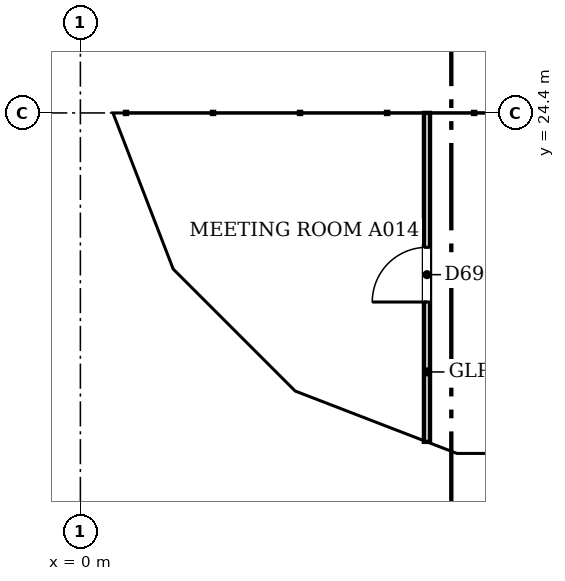
"""IFC4 building model, lengths in metres.
Left out: names, types, materials, properties, quantities, classifications, styles, units other than length and angle.
Written with IfcOpenShell. Run it as: python <this file> out.ifc"""

import sys

from ifc_helpers import new_model, si_unit, direction, frame, frame_2d, origin, place, context, subcontext, project, spatial, polyline, rectangle, outline, extrude, faceted_brep, source, transform, mapped, element, fill, save


model = new_model("IFC4")
c1 = context("Model", 3, precision=1e-05, world=origin(), true_north=direction((0.0, 1.0)))
c2 = subcontext(c1, "Body", "Model", "MODEL_VIEW")
j1 = project(units=[si_unit("LENGTHUNIT", "METRE"), si_unit("PLANEANGLEUNIT", "RADIAN")], contexts=[c1])
p1 = place(None, origin())
s1 = spatial("IfcSite", under=j1, at=p1, CompositionType="ELEMENT")
p2 = place(p1, origin())
s2 = spatial("IfcBuilding", under=s1, at=p2, CompositionType="ELEMENT")
p3 = place(p2, frame((0.0, 0.0, 48.6)))
s3 = spatial("IfcBuildingStorey", under=s2, at=p3, CompositionType="ELEMENT", Elevation=48.6)
m1 = source(origin(), c2, "Body", "Brep", [
    faceted_brep([(3.05, -0.25, 0.0), (6.053, -0.25, 3.8), (3.05, -0.25, 7.6), (0.0, -0.25, 3.8), (0.0, 0.25, 3.8), (3.05, 0.25, 7.6), (6.007, 0.25, 3.859), (6.007, 0.25, 3.741), (3.05, 0.25, 0.0), (6.053, 0.0, 3.8)], [[[0, 1, 2, 3]], [[4, 5, 6, 7, 8]], [[8, 7, 9, 1, 0]], [[6, 5, 2, 1, 9]], [[5, 4, 3, 2]], [[4, 8, 0, 3]], [[7, 6, 9]]]),
])
p4 = place(p3, frame((0.25, 30.5, -3.8), z_axis=(0.0, 0.0, 1.0), x_axis=(0.0, -1.0, 0.0)))
e1 = element("IfcWall", 1, at=p4, inside=s3, PredefinedType="SOLIDWALL", context=c2, shape_type="MappedRepresentation", body=[
    mapped(m1, transform((0.0, 0.0, 0.0), scale=1.0)),
])
m2 = source(origin(), c2, "Body", "SweptSolid", [
    extrude(outline(polyline([(3.049, 0.401), (5.735, 3.8), (3.049, 7.199), (0.321, 3.8), (3.049, 0.401)])), frame((0.0, 0.26, 0.0), z_axis=(0.0, -1.0, 0.0), x_axis=(1.0, 0.0, 0.0)), (0.0, 0.0, 1.0), 0.52),
])
p5 = place(p4, origin())
e2 = element("IfcOpeningElement", 2, at=p5, cuts=e1, PredefinedType="OPENING", context=c2, shape_type="MappedRepresentation", body=[
    mapped(m2, transform((0.0, 0.0, 0.0), scale=1.0)),
])
m3 = source(origin(), c2, "Body", "Brep", [
    faceted_brep([(2.95, -0.25, 0.0), (3.003, -0.25, 0.068), (3.003, -0.25, 7.531), (2.95, -0.25, 7.6), (0.0, -0.25, 3.8), (0.047, 0.25, 3.86), (2.898, 0.25, 7.532), (2.898, 0.25, 0.068), (0.047, 0.25, 3.74), (2.95, 0.0, 0.0), (2.95, 0.0, 7.6), (0.0, 0.0, 3.8)], [[[0, 1, 2, 3, 4]], [[5, 6, 7, 8]], [[1, 0, 9]], [[10, 3, 2]], [[6, 5, 11, 4, 3, 10]], [[8, 7, 9, 0, 4, 11]], [[8, 11, 5]], [[1, 9, 7, 6, 10, 2]]]),
])
p6 = place(p3, frame((0.25, 24.447, -3.8), z_axis=(0.0, 0.0, 1.0), x_axis=(0.35992665181, -0.932980602862, 0.0)))
e3 = element("IfcWall", 3, at=p6, inside=s3, PredefinedType="SOLIDWALL", context=c2, shape_type="MappedRepresentation", body=[
    mapped(m3, transform((0.0, 0.0, 0.0), scale=1.0)),
])
m4 = source(origin(), c2, "Body", "SweptSolid", [
    extrude(outline(polyline([(2.75, 6.935), (0.316, 3.8), (2.75, 0.665), (2.75, 6.935)])), frame((0.0, 0.26, 0.0), z_axis=(0.0, -1.0, 0.0), x_axis=(1.0, 0.0, 0.0)), (0.0, 0.0, 1.0), 0.52),
])
p7 = place(p6, origin())
e4 = element("IfcOpeningElement", 4, at=p7, cuts=e3, PredefinedType="OPENING", context=c2, shape_type="MappedRepresentation", body=[
    mapped(m4, transform((0.0, 0.0, 0.0), scale=1.0)),
])
m5 = source(origin(), c2, "Body", "Brep", [
    faceted_brep([(0.053, -0.25, 0.0), (2.997, -0.25, 3.8), (0.053, -0.25, 7.6), (0.0, -0.25, 7.532), (0.0, -0.25, 0.068), (0.106, 0.25, 7.531), (2.944, 0.25, 3.868), (2.944, 0.25, 3.732), (0.106, 0.25, 0.068), (2.997, 0.0, 3.8), (0.053, 0.0, 0.0), (0.053, 0.0, 7.6)], [[[0, 1, 2, 3, 4]], [[5, 6, 7, 8]], [[8, 7, 9, 1, 0, 10]], [[6, 5, 11, 2, 1, 9]], [[3, 2, 11]], [[10, 0, 4]], [[8, 10, 4, 3, 11, 5]], [[7, 6, 9]]]),
])
p8 = place(p3, frame((1.274, 21.731, -3.8), z_axis=(0.0, 0.0, 1.0), x_axis=(0.707147509625, -0.707066050402, 0.0)))
e5 = element("IfcWall", 5, at=p8, inside=s3, PredefinedType="SOLIDWALL", context=c2, shape_type="MappedRepresentation", body=[
    mapped(m5, transform((0.0, 0.0, 0.0), scale=1.0)),
])
m6 = source(origin(), c2, "Body", "SweptSolid", [
    extrude(outline(polyline([(0.253, 0.666), (2.681, 3.8), (0.253, 6.934), (0.253, 0.666)])), frame((0.0, 0.26, 0.0), z_axis=(0.0, -1.0, 0.0), x_axis=(1.0, 0.0, 0.0)), (0.0, 0.0, 1.0), 0.52),
])
p9 = place(p8, origin())
e6 = element("IfcOpeningElement", 6, at=p9, cuts=e5, PredefinedType="OPENING", context=c2, shape_type="MappedRepresentation", body=[
    mapped(m6, transform((0.0, 0.0, 0.0), scale=1.0)),
])
m7 = source(origin(), c2, "Body", "Brep", [
    faceted_brep([(2.95, -0.25, 0.0), (2.997, -0.25, 0.059), (2.997, -0.25, 7.541), (2.95, -0.25, 7.6), (0.0, -0.25, 3.8), (0.053, 0.25, 3.868), (2.904, 0.25, 7.54), (2.904, 0.25, 0.06), (0.053, 0.25, 3.732), (2.95, 0.0, 0.0), (2.95, 0.0, 7.6), (0.0, 0.0, 3.8)], [[[0, 1, 2, 3, 4]], [[5, 6, 7, 8]], [[1, 0, 9]], [[10, 3, 2]], [[6, 5, 11, 4, 3, 10]], [[8, 7, 9, 0, 4, 11]], [[8, 11, 5]], [[1, 9, 7, 6, 10, 2]]]),
])
p10 = place(p3, frame((3.394, 19.612, -3.8), z_axis=(0.0, 0.0, 1.0), x_axis=(0.932990326376, -0.359901446078, 0.0)))
e7 = element("IfcWall", 7, at=p10, inside=s3, PredefinedType="SOLIDWALL", context=c2, shape_type="MappedRepresentation", body=[
    mapped(m7, transform((0.0, 0.0, 0.0), scale=1.0)),
])
p11 = place(p10, origin())
e8 = element("IfcOpeningElement", 8, at=p11, cuts=e7, PredefinedType="OPENING", context=c2, shape_type="MappedRepresentation", body=[
    mapped(m4, transform((0.0, 0.0, 0.0), scale=1.0)),
])
m8 = source(origin(), c2, "Body", "Brep", [
    faceted_brep([(0.047, -0.25, 0.0), (3.05, -0.25, 3.8), (0.047, -0.25, 7.6), (0.0, -0.25, 7.54), (0.0, -0.25, 0.06), (0.093, 0.25, 7.541), (3.05, 0.25, 3.8), (0.093, 0.25, 0.059), (0.047, 0.0, 0.0), (0.047, 0.0, 7.6)], [[[0, 1, 2, 3, 4]], [[5, 6, 7]], [[7, 6, 1, 0, 8]], [[6, 5, 9, 2, 1]], [[3, 2, 9]], [[8, 0, 4]], [[7, 8, 4, 3, 9, 5]]]),
])
p12 = place(p3, frame((6.1, 18.55, -3.8), z_axis=(0.0, 0.0, 1.0), x_axis=(1.0, 0.0, 0.0)))
e9 = element("IfcWall", 9, at=p12, inside=s3, PredefinedType="SOLIDWALL", context=c2, shape_type="MappedRepresentation", body=[
    mapped(m8, transform((0.0, 0.0, 0.0), scale=1.0)),
])
m9 = source(origin(), c2, "Body", "SweptSolid", [
    extrude(outline(polyline([(0.247, 0.656), (2.731, 3.8), (0.247, 6.944), (0.247, 0.656)])), frame((0.0, 0.26, 0.0), z_axis=(0.0, -1.0, 0.0), x_axis=(1.0, 0.0, 0.0)), (0.0, 0.0, 1.0), 0.52),
])
p13 = place(p12, origin())
e10 = element("IfcOpeningElement", 10, at=p13, cuts=e9, PredefinedType="OPENING", context=c2, shape_type="MappedRepresentation", body=[
    mapped(m9, transform((0.0, 0.0, 0.0), scale=1.0)),
])
p14 = place(p2, frame((0.0, 0.0, 52.4)))
s4 = spatial("IfcBuildingStorey", under=s2, at=p14, CompositionType="ELEMENT", Elevation=52.4)
m10 = source(origin(), c2, "Body", "Brep", [
    faceted_brep([(3.003, -0.25, 0.0), (3.05, -0.25, 0.06), (3.05, -0.25, 7.54), (3.003, -0.25, 7.6), (0.0, -0.25, 3.8), (0.0, 0.25, 3.8), (2.957, 0.25, 7.541), (2.957, 0.25, 0.059), (3.003, 0.0, 0.0), (3.003, 0.0, 7.6)], [[[0, 1, 2, 3, 4]], [[5, 6, 7]], [[1, 0, 8]], [[9, 3, 2]], [[6, 5, 4, 3, 9]], [[5, 7, 8, 0, 4]], [[1, 8, 7, 6, 9, 2]]]),
])
p15 = place(p14, frame((0.25, 27.45, -3.8), z_axis=(0.0, 0.0, 1.0), x_axis=(0.0, -1.0, 0.0)))
e11 = element("IfcWall", 11, at=p15, inside=s4, PredefinedType="SOLIDWALL", context=c2, shape_type="MappedRepresentation", body=[
    mapped(m10, transform((0.0, 0.0, 0.0), scale=1.0)),
])
m11 = source(origin(), c2, "Body", "SweptSolid", [
    extrude(outline(polyline([(2.803, 6.944), (0.319, 3.8), (2.803, 0.656), (2.803, 6.944)])), frame((0.0, 0.26, 0.0), z_axis=(0.0, -1.0, 0.0), x_axis=(1.0, 0.0, 0.0)), (0.0, 0.0, 1.0), 0.52),
])
p16 = place(p15, origin())
e12 = element("IfcOpeningElement", 12, at=p16, cuts=e11, PredefinedType="OPENING", context=c2, shape_type="MappedRepresentation", body=[
    mapped(m11, transform((0.0, 0.0, 0.0), scale=1.0)),
])
m12 = source(origin(), c2, "Body", "Brep", [
    faceted_brep([(0.047, -0.25, 0.0), (2.997, -0.25, 3.8), (0.047, -0.25, 7.6), (0.0, -0.25, 7.541), (0.0, -0.25, 0.059), (0.093, 0.25, 7.54), (2.944, 0.25, 3.868), (2.944, 0.25, 3.732), (0.093, 0.25, 0.06), (2.997, 0.0, 3.8), (0.047, 0.0, 0.0), (0.047, 0.0, 7.6)], [[[0, 1, 2, 3, 4]], [[5, 6, 7, 8]], [[8, 7, 9, 1, 0, 10]], [[6, 5, 11, 2, 1, 9]], [[3, 2, 11]], [[10, 0, 4]], [[8, 10, 4, 3, 11, 5]], [[9, 7, 6]]]),
])
p17 = place(p14, frame((0.233, 24.49, -3.8), z_axis=(0.0, 0.0, 1.0), x_axis=(0.359901446078, -0.932990326376, 0.0)))
e13 = element("IfcWall", 13, at=p17, inside=s4, PredefinedType="SOLIDWALL", context=c2, shape_type="MappedRepresentation", body=[
    mapped(m12, transform((0.0, 0.0, 0.0), scale=1.0)),
])
m13 = source(origin(), c2, "Body", "SweptSolid", [
    extrude(outline(polyline([(0.247, 0.665), (2.681, 3.8), (0.247, 6.935), (0.247, 0.665)])), frame((0.0, 0.26, 0.0), z_axis=(0.0, -1.0, 0.0), x_axis=(1.0, 0.0, 0.0)), (0.0, 0.0, 1.0), 0.52),
])
p18 = place(p17, origin())
e14 = element("IfcOpeningElement", 14, at=p18, cuts=e13, PredefinedType="OPENING", context=c2, shape_type="MappedRepresentation", body=[
    mapped(m13, transform((0.0, 0.0, 0.0), scale=1.0)),
])
m14 = source(origin(), c2, "Body", "Brep", [
    faceted_brep([(2.944, -0.25, 0.0), (2.997, -0.25, 0.068), (2.997, -0.25, 7.532), (2.944, -0.25, 7.6), (0.0, -0.25, 3.8), (0.053, 0.25, 3.868), (2.891, 0.25, 7.532), (2.891, 0.25, 0.068), (0.053, 0.25, 3.731), (2.944, 0.0, 0.0), (2.944, 0.0, 7.6), (0.0, 0.0, 3.8)], [[[0, 1, 2, 3, 4]], [[5, 6, 7, 8]], [[1, 0, 9]], [[10, 3, 2]], [[6, 5, 11, 4, 3, 10]], [[8, 7, 9, 0, 4, 11]], [[8, 11, 5]], [[1, 9, 7, 6, 10, 2]]]),
])
p19 = place(p14, frame((1.312, 21.694, -3.8), z_axis=(0.0, 0.0, 1.0), x_axis=(0.707066050402, -0.707147509625, 0.0)))
e15 = element("IfcWall", 15, at=p19, inside=s4, PredefinedType="SOLIDWALL", context=c2, shape_type="MappedRepresentation", body=[
    mapped(m14, transform((0.0, 0.0, 0.0), scale=1.0)),
])
m15 = source(origin(), c2, "Body", "SweptSolid", [
    extrude(outline(polyline([(2.744, 6.934), (0.316, 3.8), (2.744, 0.666), (2.744, 6.934)])), frame((0.0, 0.26, 0.0), z_axis=(0.0, -1.0, 0.0), x_axis=(1.0, 0.0, 0.0)), (0.0, 0.0, 1.0), 0.52),
])
p20 = place(p19, origin())
e16 = element("IfcOpeningElement", 16, at=p20, cuts=e15, PredefinedType="OPENING", context=c2, shape_type="MappedRepresentation", body=[
    mapped(m15, transform((0.0, 0.0, 0.0), scale=1.0)),
])
m16 = source(origin(), c2, "Body", "Brep", [
    faceted_brep([(0.053, -0.25, 0.0), (3.003, -0.25, 3.8), (0.053, -0.25, 7.6), (0.0, -0.25, 7.531), (0.0, -0.25, 0.068), (0.106, 0.25, 7.532), (2.957, 0.25, 3.86), (2.957, 0.25, 3.74), (0.106, 0.25, 0.068), (3.003, 0.0, 3.8), (0.053, 0.0, 0.0), (0.053, 0.0, 7.6)], [[[0, 1, 2, 3, 4]], [[5, 6, 7, 8]], [[8, 7, 9, 1, 0, 10]], [[6, 5, 11, 2, 1, 9]], [[3, 2, 11]], [[10, 0, 4]], [[8, 10, 4, 3, 11, 5]], [[9, 7, 6]]]),
])
p21 = place(p14, frame((3.344, 19.631, -3.8), z_axis=(0.0, 0.0, 1.0), x_axis=(0.933007896601, -0.359855894603, 0.0)))
e17 = element("IfcWall", 17, at=p21, inside=s4, PredefinedType="SOLIDWALL", context=c2, shape_type="MappedRepresentation", body=[
    mapped(m16, transform((0.0, 0.0, 0.0), scale=1.0)),
])
m17 = source(origin(), c2, "Body", "SweptSolid", [
    extrude(outline(polyline([(0.253, 0.665), (2.687, 3.8), (0.253, 6.935), (0.253, 0.665)])), frame((0.0, 0.26, 0.0), z_axis=(0.0, -1.0, 0.0), x_axis=(1.0, 0.0, 0.0)), (0.0, 0.0, 1.0), 0.52),
])
p22 = place(p21, origin())
e18 = element("IfcOpeningElement", 18, at=p22, cuts=e17, PredefinedType="OPENING", context=c2, shape_type="MappedRepresentation", body=[
    mapped(m17, transform((0.0, 0.0, 0.0), scale=1.0)),
])
m18 = source(origin(), c2, "Body", "Brep", [
    faceted_brep([(3.003, -0.25, 0.0), (6.053, -0.25, 3.8), (3.003, -0.25, 7.6), (0.0, -0.25, 3.8), (0.047, 0.25, 3.859), (3.003, 0.25, 7.6), (6.053, 0.25, 3.8), (3.003, 0.25, 0.0), (0.047, 0.25, 3.741), (0.0, 0.0, 3.8)], [[[0, 1, 2, 3]], [[4, 5, 6, 7, 8]], [[7, 6, 1, 0]], [[6, 5, 2, 1]], [[5, 4, 9, 3, 2]], [[8, 7, 0, 3, 9]], [[8, 9, 4]]]),
])
p23 = place(p14, frame((6.146, 18.55, -3.8), z_axis=(0.0, 0.0, 1.0), x_axis=(1.0, 0.0, 0.0)))
e19 = element("IfcWall", 19, at=p23, inside=s4, PredefinedType="SOLIDWALL", context=c2, shape_type="MappedRepresentation", body=[
    mapped(m18, transform((0.0, 0.0, 0.0), scale=1.0)),
])
m19 = source(origin(), c2, "Body", "SweptSolid", [
    extrude(outline(polyline([(3.005, 0.401), (5.733, 3.8), (3.005, 7.199), (0.319, 3.8), (3.005, 0.401)])), frame((0.0, 0.26, 0.0), z_axis=(0.0, -1.0, 0.0), x_axis=(1.0, 0.0, 0.0)), (0.0, 0.0, 1.0), 0.52),
])
p24 = place(p23, origin())
e20 = element("IfcOpeningElement", 20, at=p24, cuts=e19, PredefinedType="OPENING", context=c2, shape_type="MappedRepresentation", body=[
    mapped(m19, transform((0.0, 0.0, 0.0), scale=1.0)),
])
p25 = place(p3, frame((5.7, 18.99, 0.0), z_axis=(0.0, 0.0, 1.0), x_axis=(0.0, 1.0, 0.0)))
e21 = element("IfcWall", 21, at=p25, inside=s3, PredefinedType="PARTITIONING", context=c2, shape_type="SweptSolid", body=[
    extrude(rectangle(XDim=5.41, YDim=0.1, at=frame_2d((2.705, 0.0))), origin(), (0.0, 0.0, 1.0), 3.067),
])
m20 = source(origin(), c2, "Body", "SweptSolid", [
    extrude(rectangle(XDim=0.9, YDim=2.1, at=frame_2d((0.45, 1.05))), frame((0.0, 0.06, 0.0), z_axis=(0.0, -1.0, 0.0), x_axis=(1.0, 0.0, 0.0)), (0.0, 0.0, 1.0), 0.12),
])
p26 = place(p25, frame((2.3, 0.0, 0.0)))
e22 = element("IfcOpeningElement", 22, at=p26, cuts=e21, PredefinedType="OPENING", context=c2, shape_type="MappedRepresentation", body=[
    mapped(m20, transform((0.0, 0.0, 0.0), scale=1.0)),
])
m21 = source(origin(), c2, "Body", "SweptSolid", [
    extrude(rectangle(XDim=0.9, YDim=2.1, at=frame_2d((0.45, 1.05))), frame((0.0, 0.025, 0.0), z_axis=(0.0, -1.0, 0.0), x_axis=(1.0, 0.0, 0.0)), (0.0, 0.0, 1.0), 0.05),
])
p27 = place(p26, origin())
e23 = element("IfcDoor", 23, at=p27, inside=s3, OperationType="SINGLE_SWING_LEFT", PredefinedType="DOOR", context=c2, shape_type="MappedRepresentation", body=[
    mapped(m21, transform((0.0, 0.0, 0.0), scale=1.0)),
])
fill(e22, e23)
save(model, sys.argv[1])
